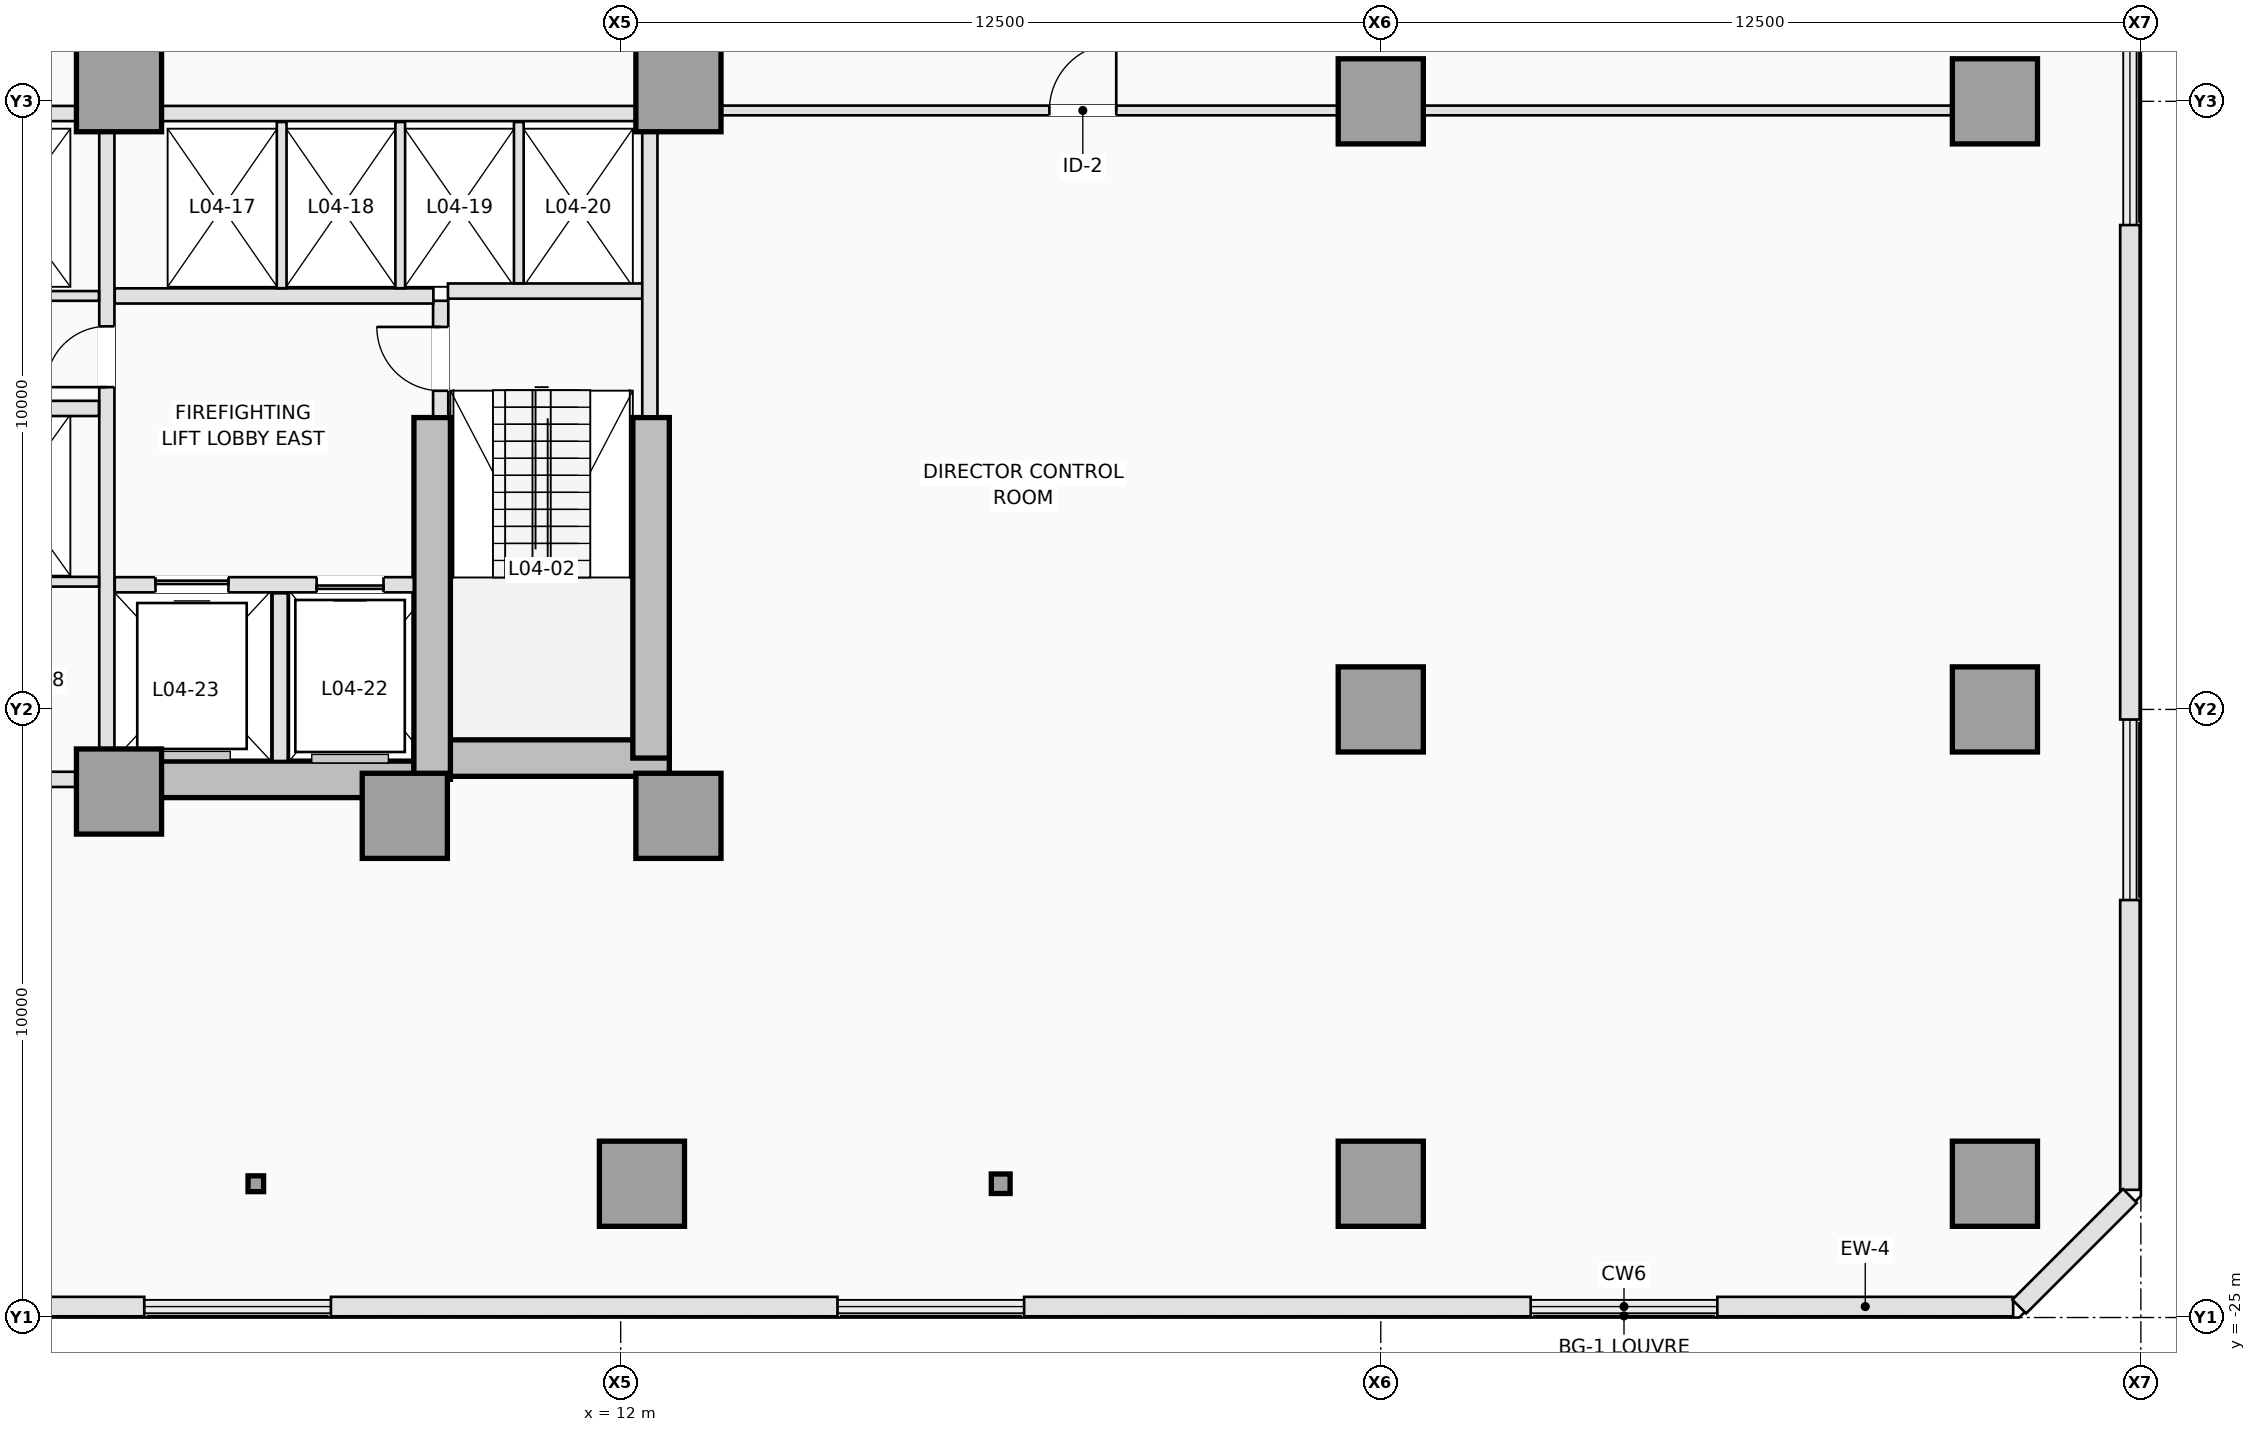
"""IFC4 building model, lengths in metres.
Left out: names, types, materials, properties, quantities, classifications, styles, units other than length and angle.
Written with IfcOpenShell. Run it as: python <this file> out.ifc"""

import sys

from ifc_helpers import new_model, si_unit, direction, frame, frame_2d, origin, origin_2d, place, context, subcontext, project, spatial, rectangle, i_section, extrude, element, fill, save


model = new_model("IFC4")
c1 = context("Model", 3, precision=1e-05, world=origin(), true_north=direction((0.0, 1.0)))
c2 = subcontext(c1, "Body", "Model", "MODEL_VIEW")
j1 = project(units=[si_unit("LENGTHUNIT", "METRE"), si_unit("PLANEANGLEUNIT", "RADIAN")], contexts=[c1])
p1 = place(None, origin())
s1 = spatial("IfcSite", under=j1, at=p1, CompositionType="ELEMENT")
p2 = place(p1, origin())
s2 = spatial("IfcBuilding", under=s1, at=p2, CompositionType="ELEMENT")
p3 = place(p2, frame((0.0, 0.0, 18.5)))
s3 = spatial("IfcBuildingStorey", under=s2, at=p3, CompositionType="ELEMENT", Elevation=18.5)
p4 = place(p3, frame((3.75, -16.15, 0.0), z_axis=(0.0, 0.0, 1.0), x_axis=(1.0, 0.0, 0.0)))
e1 = element("IfcWall", 1, at=p4, inside=s3, PredefinedType="SHEAR", context=c2, shape_type="SweptSolid", body=[
    extrude(rectangle(XDim=5.15, YDim=0.6, at=frame_2d((2.575, 0.0))), origin(), (0.0, 0.0, 1.0), 4.5),
])
p5 = place(p3, frame((8.6, -15.8, 0.0), z_axis=(0.0, 0.0, 1.0), x_axis=(1.0, 0.0, 0.0)))
e2 = element("IfcWall", 2, at=p5, inside=s3, PredefinedType="SHEAR", context=c2, shape_type="SweptSolid", body=[
    extrude(rectangle(XDim=4.2, YDim=0.6, at=frame_2d((2.1, 0.0))), origin(), (0.0, 0.0, 1.0), 4.5),
])
p6 = place(p3, frame((12.5, -15.8, 0.0), z_axis=(0.0, 0.0, 1.0), x_axis=(0.0, 1.0, 0.0)))
e3 = element("IfcWall", 3, at=p6, inside=s3, PredefinedType="SHEAR", context=c2, shape_type="SweptSolid", body=[
    extrude(rectangle(XDim=5.6, YDim=0.6, at=frame_2d((2.8, 0.0))), origin(), (0.0, 0.0, 1.0), 4.5),
])
p7 = place(p3, frame((8.9, -16.15, 0.0), z_axis=(0.0, 0.0, 1.0), x_axis=(0.0, 1.0, 0.0)))
e4 = element("IfcWall", 4, at=p7, inside=s3, PredefinedType="SHEAR", context=c2, shape_type="SweptSolid", body=[
    extrude(rectangle(XDim=5.95, YDim=0.6, at=frame_2d((2.975, 0.0))), origin(), (0.0, 0.0, 1.0), 4.5),
])
for number, where, z_axis, x_axis in (
    (5, (3.75, -16.35, 0.0), (0.0, 0.0, 1.0), (1.0, 0.0, 0.0)),
    (6, (8.45, -16.75, 0.0), (0.0, 0.0, 1.0), (1.0, 0.0, 0.0)),
    (7, (12.95, -16.75, 0.0), (0.0, 0.0, 1.0), (1.0, 0.0, 0.0)),
    (8, (3.75, -4.8, 0.0), (0.0, 0.0, 1.0), (1.0, 0.0, 0.0)),
    (9, (12.95, -4.8, 0.0), (0.0, 0.0, 1.0), (1.0, 0.0, 0.0)),
    (10, (12.35, -22.8, 0.0), (0.0, 0.0, 1.0), (1.0, 0.0, 0.0)),
    (11, (24.5, -22.8, 0.0), (0.0, 0.0, 1.0), (1.0, 0.0, 0.0)),
    (12, (34.6, -22.8, 0.0), (0.0, 0.0, 1.0), (1.0, 0.0, 0.0)),
    (13, (24.5, -15.0, 0.0), (0.0, 0.0, 1.0), (1.0, 0.0, 0.0)),
    (14, (34.6, -15.0, 0.0), (0.0, 0.0, 1.0), (1.0, 0.0, 0.0)),
    (15, (24.5, -5.0, 0.0), (0.0, 0.0, 1.0), (1.0, 0.0, 0.0)),
    (16, (34.6, -5.0, 0.0), (0.0, 0.0, 1.0), (1.0, 0.0, 0.0)),
):
    element("IfcColumn", number, at=place(p3, frame(where, z_axis=z_axis, x_axis=x_axis)), inside=s3, PredefinedType="COLUMN", context=c2, shape_type="SweptSolid", body=[
        extrude(rectangle(XDim=1.4, YDim=1.4, at=origin_2d()), origin(), (0.0, 0.0, 1.0), 4.5),
    ])
p8 = place(p3, frame((18.25, -22.8, 0.0), z_axis=(0.0, 0.0, 1.0), x_axis=(1.0, 0.0, 0.0)))
e17 = element("IfcColumn", 17, at=p8, inside=s3, PredefinedType="COLUMN", context=c2, shape_type="SweptSolid", body=[
    extrude(i_section(OverallWidth=0.309, OverallDepth=0.321, WebThickness=0.014, FlangeThickness=0.022, FilletRadius=0.017, at=origin_2d()), origin(), (0.0, 0.0, 1.0), 4.5),
])
p9 = place(p3, frame((6.0, -22.8, 0.0), z_axis=(0.0, 0.0, 1.0), x_axis=(1.0, 0.0, 0.0)))
e18 = element("IfcColumn", 18, at=p9, inside=s3, PredefinedType="COLUMN", context=c2, shape_type="SweptSolid", body=[
    extrude(i_section(OverallWidth=0.256, OverallDepth=0.26, WebThickness=0.01, FlangeThickness=0.017, FilletRadius=0.014, at=origin_2d()), origin(), (0.0, 0.0, 1.0), 4.5),
])
p10 = place(p3, frame((34.9, -24.82, 0.0), z_axis=(0.0, 0.0, 1.0), x_axis=(-1.0, 0.0, 0.0)))
e19 = element("IfcWall", 19, at=p10, inside=s3, PredefinedType="STANDARD", context=c2, shape_type="SweptSolid", body=[
    extrude(rectangle(XDim=4.865, YDim=0.32, at=frame_2d((2.433, 0.0))), origin(), (0.0, 0.0, 1.0), 4.08),
])
p11 = place(p3, frame((26.965, -24.82, 0.0), z_axis=(0.0, 0.0, 1.0), x_axis=(-1.0, 0.0, 0.0)))
e20 = element("IfcWall", 20, at=p11, inside=s3, PredefinedType="STANDARD", context=c2, shape_type="SweptSolid", body=[
    extrude(rectangle(XDim=8.33, YDim=0.32, at=frame_2d((4.165, 0.0))), origin(), (0.0, 0.0, 1.0), 4.08),
])
p12 = place(p3, frame((15.565, -24.82, 0.0), z_axis=(0.0, 0.0, 1.0), x_axis=(-1.0, 0.0, 0.0)))
e21 = element("IfcWall", 21, at=p12, inside=s3, PredefinedType="STANDARD", context=c2, shape_type="SweptSolid", body=[
    extrude(rectangle(XDim=8.33, YDim=0.32, at=frame_2d((4.165, 0.0))), origin(), (0.0, 0.0, 1.0), 4.08),
])
p13 = place(p3, frame((4.165, -24.82, 0.0), z_axis=(0.0, 0.0, 1.0), x_axis=(-1.0, 0.0, 0.0)))
e22 = element("IfcWall", 22, at=p13, inside=s3, PredefinedType="STANDARD", context=c2, shape_type="SweptSolid", body=[
    extrude(rectangle(XDim=8.33, YDim=0.32, at=frame_2d((4.165, 0.0))), origin(), (0.0, 0.0, 1.0), 4.08),
])
p14 = place(p3, frame((36.82, -7.035, 0.0), z_axis=(0.0, 0.0, 1.0), x_axis=(0.0, -1.0, 0.0)))
e23 = element("IfcWall", 23, at=p14, inside=s3, PredefinedType="STANDARD", context=c2, shape_type="SweptSolid", body=[
    extrude(rectangle(XDim=8.131, YDim=0.32, at=frame_2d((4.065, 0.0))), origin(), (0.0, 0.0, 1.0), 4.08),
])
p15 = place(p3, frame((36.82, -18.135, 0.0), z_axis=(0.0, 0.0, 1.0), x_axis=(0.0, -1.0, 0.0)))
e24 = element("IfcWall", 24, at=p15, inside=s3, PredefinedType="STANDARD", context=c2, shape_type="SweptSolid", body=[
    extrude(rectangle(XDim=4.765, YDim=0.32, at=frame_2d((2.383, 0.0))), origin(), (0.0, 0.0, 1.0), 4.08),
])
p16 = place(p3, frame((36.82, -23.0, 0.0), z_axis=(0.0, 0.0, 1.0), x_axis=(-0.707106781187, -0.707106781187, 0.0)))
e25 = element("IfcWall", 25, at=p16, inside=s3, PredefinedType="STANDARD", context=c2, shape_type="SweptSolid", body=[
    extrude(rectangle(XDim=2.574, YDim=0.32, at=frame_2d((1.287, 0.0))), origin(), (0.0, 0.0, 1.0), 4.08),
])
p17 = place(p3, frame((9.04, -10.18, 0.0), z_axis=(0.0, 0.0, 1.0), x_axis=(0.0, 1.0, 0.0)))
e26 = element("IfcWall", 26, at=p17, inside=s3, PredefinedType="PARTITIONING", context=c2, shape_type="SweptSolid", body=[
    extrude(rectangle(XDim=1.9, YDim=0.25, at=frame_2d((0.95, 0.0))), origin(), (0.0, 0.0, 1.0), 4.08),
])
p18 = place(p17, frame((0.42, 0.0, 0.0)))
e27 = element("IfcOpeningElement", 27, at=p18, cuts=e26, PredefinedType="OPENING", context=c2, shape_type="SweptSolid", body=[
    extrude(rectangle(XDim=1.05, YDim=2.15, at=frame_2d((0.525, 1.075))), frame((0.0, 0.135, 0.0), z_axis=(0.0, -1.0, 0.0), x_axis=(1.0, 0.0, 0.0)), (0.0, 0.0, 1.0), 0.27),
])
p19 = place(p3, frame((9.16, -8.12, 0.0), z_axis=(0.0, 0.0, 1.0), x_axis=(1.0, 0.0, 0.0)))
e28 = element("IfcWall", 28, at=p19, inside=s3, PredefinedType="PARTITIONING", context=c2, shape_type="SweptSolid", body=[
    extrude(rectangle(XDim=3.22, YDim=0.25, at=frame_2d((1.61, 0.0))), origin(), (0.0, 0.0, 1.0), 4.08),
])
p20 = place(p3, frame((12.48, -10.18, 0.0), z_axis=(0.0, 0.0, 1.0), x_axis=(0.0, 1.0, 0.0)))
e29 = element("IfcWall", 29, at=p20, inside=s3, PredefinedType="PARTITIONING", context=c2, shape_type="SweptSolid", body=[
    extrude(rectangle(XDim=4.678, YDim=0.25, at=frame_2d((2.339, 0.0))), origin(), (0.0, 0.0, 1.0), 4.08),
])
p21 = place(p3, frame((3.68, -12.95, 0.0), z_axis=(0.0, 0.0, 1.0), x_axis=(1.0, 0.0, 0.0)))
e30 = element("IfcWall", 30, at=p21, inside=s3, PredefinedType="PARTITIONING", context=c2, shape_type="SweptSolid", body=[
    extrude(rectangle(XDim=4.918, YDim=0.25, at=frame_2d((2.459, 0.0))), origin(), (0.0, 0.0, 1.0), 4.08),
])
p22 = place(p21, frame((3.32, 0.0, 0.0)))
e31 = element("IfcOpeningElement", 31, at=p22, cuts=e30, PredefinedType="OPENING", context=c2, shape_type="SweptSolid", body=[
    extrude(rectangle(XDim=1.1, YDim=2.15, at=frame_2d((0.55, 1.075))), frame((0.0, 0.135, 0.0), z_axis=(0.0, -1.0, 0.0), x_axis=(1.0, 0.0, 0.0)), (0.0, 0.0, 1.0), 0.27),
])
p23 = place(p21, frame((0.67, 0.0, 0.0)))
e32 = element("IfcOpeningElement", 32, at=p23, cuts=e30, PredefinedType="OPENING", context=c2, shape_type="SweptSolid", body=[
    extrude(rectangle(XDim=1.2, YDim=2.15, at=frame_2d((0.6, 1.075))), frame((0.0, 0.135, 0.0), z_axis=(0.0, -1.0, 0.0), x_axis=(1.0, 0.0, 0.0)), (0.0, 0.0, 1.0), 0.27),
])
p24 = place(p3, frame((6.4, -15.848, 0.0), z_axis=(0.0, 0.0, 1.0), x_axis=(0.0, 1.0, 0.0)))
e33 = element("IfcWall", 33, at=p24, inside=s3, PredefinedType="PARTITIONING", context=c2, shape_type="SweptSolid", body=[
    extrude(rectangle(XDim=2.758, YDim=0.25, at=frame_2d((1.379, 0.0))), origin(), (0.0, 0.0, 1.0), 4.08),
])
p25 = place(p3, frame((3.68, -8.2, 0.0), z_axis=(0.0, 0.0, 1.0), x_axis=(1.0, 0.0, 0.0)))
e34 = element("IfcWall", 34, at=p25, inside=s3, PredefinedType="PARTITIONING", context=c2, shape_type="SweptSolid", body=[
    extrude(rectangle(XDim=5.24, YDim=0.25, at=frame_2d((2.62, 0.0))), origin(), (0.0, 0.0, 1.0), 4.08),
])
p26 = place(p3, frame((3.55, -15.648, 0.0), z_axis=(0.0, 0.0, 1.0), x_axis=(0.0, 1.0, 0.0)))
e35 = element("IfcWall", 35, at=p26, inside=s3, PredefinedType="PARTITIONING", context=c2, shape_type="SweptSolid", body=[
    extrude(rectangle(XDim=10.146, YDim=0.25, at=frame_2d((5.073, 0.0))), origin(), (0.0, 0.0, 1.0), 4.08),
])
p27 = place(p26, frame((5.948, 0.0, 0.0)))
e36 = element("IfcOpeningElement", 36, at=p27, cuts=e35, PredefinedType="OPENING", context=c2, shape_type="SweptSolid", body=[
    extrude(rectangle(XDim=1.0, YDim=2.15, at=frame_2d((0.5, 1.075))), frame((0.0, 0.135, 0.0), z_axis=(0.0, -1.0, 0.0), x_axis=(1.0, 0.0, 0.0)), (0.0, 0.0, 1.0), 0.27),
])
p28 = place(p3, frame((4.452, -5.2, 0.0), z_axis=(0.0, 0.0, 1.0), x_axis=(1.0, 0.0, 0.0)))
e37 = element("IfcWall", 37, at=p28, inside=s3, PredefinedType="PARTITIONING", context=c2, shape_type="SweptSolid", body=[
    extrude(rectangle(XDim=7.796, YDim=0.25, at=frame_2d((3.898, 0.0))), origin(), (0.0, 0.0, 1.0), 4.08),
])
p29 = place(p3, frame((0.95, -5.2, 0.0), z_axis=(0.0, 0.0, 1.0), x_axis=(1.0, 0.0, 0.0)))
e38 = element("IfcWall", 38, at=p29, inside=s3, PredefinedType="PARTITIONING", context=c2, shape_type="SweptSolid", body=[
    extrude(rectangle(XDim=2.098, YDim=0.25, at=frame_2d((1.049, 0.0))), origin(), (0.0, 0.0, 1.0), 4.08),
])
for number, where, z_axis, x_axis in (
    (39, (6.425, -8.073, 0.0), (0.0, 0.0, 1.0), (0.0, 1.0, 0.0)),
    (40, (8.375, -8.073, 0.0), (0.0, 0.0, 1.0), (0.0, 1.0, 0.0)),
):
    element("IfcWall", number, at=place(p3, frame(where, z_axis=z_axis, x_axis=x_axis)), inside=s3, PredefinedType="PARTITIONING", context=c2, shape_type="SweptSolid", body=[
        extrude(rectangle(XDim=2.733, YDim=0.16, at=frame_2d((1.366, 0.0))), origin(), (0.0, 0.0, 1.0), 4.08),
    ])
p30 = place(p3, frame((10.325, -7.993, 0.0), z_axis=(0.0, 0.0, 1.0), x_axis=(0.0, 1.0, 0.0)))
e41 = element("IfcWall", 41, at=p30, inside=s3, PredefinedType="PARTITIONING", context=c2, shape_type="SweptSolid", body=[
    extrude(rectangle(XDim=2.653, YDim=0.16, at=frame_2d((1.326, 0.0))), origin(), (0.0, 0.0, 1.0), 4.08),
])
p31 = place(p3, frame((-3.048, -16.15, 0.0), z_axis=(0.0, 0.0, 1.0), x_axis=(1.0, 0.0, 0.0)))
e42 = element("IfcWall", 42, at=p31, inside=s3, PredefinedType="PARTITIONING", context=c2, shape_type="SweptSolid", body=[
    extrude(rectangle(XDim=6.096, YDim=0.25, at=frame_2d((3.048, 0.0))), origin(), (0.0, 0.0, 1.0), 3.056),
])
p32 = place(p3, frame((0.95, -8.2, 0.0), z_axis=(0.0, 0.0, 1.0), x_axis=(1.0, 0.0, 0.0)))
e43 = element("IfcWall", 43, at=p32, inside=s3, PredefinedType="PARTITIONING", context=c2, shape_type="SweptSolid", body=[
    extrude(rectangle(XDim=2.47, YDim=0.16, at=frame_2d((1.235, 0.0))), origin(), (0.0, 0.0, 1.0), 4.08),
])
p33 = place(p3, frame((0.95, -10.05, 0.0), z_axis=(0.0, 0.0, 1.0), x_axis=(1.0, 0.0, 0.0)))
e44 = element("IfcWall", 44, at=p33, inside=s3, PredefinedType="PARTITIONING", context=c2, shape_type="SweptSolid", body=[
    extrude(rectangle(XDim=2.47, YDim=0.25, at=frame_2d((1.235, 0.0))), origin(), (0.0, 0.0, 1.0), 4.08),
])
p34 = place(p3, frame((-3.42, -12.9, 0.0), z_axis=(0.0, 0.0, 1.0), x_axis=(1.0, 0.0, 0.0)))
e45 = element("IfcWall", 45, at=p34, inside=s3, PredefinedType="PARTITIONING", context=c2, shape_type="SweptSolid", body=[
    extrude(rectangle(XDim=6.84, YDim=0.16, at=frame_2d((3.42, 0.0))), origin(), (0.0, 0.0, 1.0), 4.08),
])
p35 = place(p34, frame((2.98, 0.0, 0.0)))
e46 = element("IfcOpeningElement", 46, at=p35, cuts=e45, PredefinedType="OPENING", context=c2, shape_type="SweptSolid", body=[
    extrude(rectangle(XDim=0.88, YDim=2.12, at=frame_2d((0.44, 1.06))), frame((0.0, 0.09, 0.0), z_axis=(0.0, -1.0, 0.0), x_axis=(1.0, 0.0, 0.0)), (0.0, 0.0, 1.0), 0.18),
])
p36 = place(p3, frame((13.652, -5.15, 0.0), z_axis=(0.0, 0.0, 1.0), x_axis=(1.0, 0.0, 0.0)))
e47 = element("IfcWall", 47, at=p36, inside=s3, PredefinedType="PARTITIONING", context=c2, shape_type="SweptSolid", body=[
    extrude(rectangle(XDim=10.146, YDim=0.16, at=frame_2d((5.073, 0.0))), origin(), (0.0, 0.0, 1.0), 3.056),
])
p37 = place(p36, frame((5.398, 0.0, 0.0)))
e48 = element("IfcOpeningElement", 48, at=p37, cuts=e47, PredefinedType="OPENING", context=c2, shape_type="SweptSolid", body=[
    extrude(rectangle(XDim=1.1, YDim=2.15, at=frame_2d((0.55, 1.075))), frame((0.0, 0.09, 0.0), z_axis=(0.0, -1.0, 0.0), x_axis=(1.0, 0.0, 0.0)), (0.0, 0.0, 1.0), 0.18),
])
p38 = place(p3, frame((25.202, -5.15, 0.0), z_axis=(0.0, 0.0, 1.0), x_axis=(1.0, 0.0, 0.0)))
e49 = element("IfcWall", 49, at=p38, inside=s3, PredefinedType="PARTITIONING", context=c2, shape_type="SweptSolid", body=[
    extrude(rectangle(XDim=8.696, YDim=0.16, at=frame_2d((4.348, 0.0))), origin(), (0.0, 0.0, 1.0), 3.056),
])
p39 = place(p22, origin())
e50 = element("IfcDoor", 50, at=p39, inside=s3, OperationType="SLIDING_TO_RIGHT", PredefinedType="DOOR", context=c2, shape_type="SweptSolid", body=[
    extrude(rectangle(XDim=1.1, YDim=2.15, at=frame_2d((0.55, 1.075))), frame((0.0, 0.025, 0.0), z_axis=(0.0, -1.0, 0.0), x_axis=(1.0, 0.0, 0.0)), (0.0, 0.0, 1.0), 0.05),
])
fill(e31, e50)
p40 = place(p23, origin())
e51 = element("IfcDoor", 51, at=p40, inside=s3, OperationType="SLIDING_TO_LEFT", PredefinedType="DOOR", context=c2, shape_type="SweptSolid", body=[
    extrude(rectangle(XDim=1.2, YDim=2.15, at=frame_2d((0.6, 1.075))), frame((0.0, 0.025, 0.0), z_axis=(0.0, -1.0, 0.0), x_axis=(1.0, 0.0, 0.0)), (0.0, 0.0, 1.0), 0.05),
])
fill(e32, e51)
p41 = place(p18, origin())
e52 = element("IfcDoor", 52, at=p41, inside=s3, OperationType="SINGLE_SWING_RIGHT", PredefinedType="DOOR", context=c2, shape_type="SweptSolid", body=[
    extrude(rectangle(XDim=1.05, YDim=2.15, at=frame_2d((0.525, 1.075))), frame((0.0, 0.025, 0.0), z_axis=(0.0, -1.0, 0.0), x_axis=(1.0, 0.0, 0.0)), (0.0, 0.0, 1.0), 0.05),
])
fill(e27, e52)
p42 = place(p27, origin())
e53 = element("IfcDoor", 53, at=p42, inside=s3, OperationType="SINGLE_SWING_LEFT", PredefinedType="DOOR", context=c2, shape_type="SweptSolid", body=[
    extrude(rectangle(XDim=1.0, YDim=2.15, at=frame_2d((0.5, 1.075))), frame((0.0, 0.025, 0.0), z_axis=(0.0, -1.0, 0.0), x_axis=(1.0, 0.0, 0.0)), (0.0, 0.0, 1.0), 0.05),
])
fill(e36, e53)
p43 = place(p37, origin())
e54 = element("IfcDoor", 54, at=p43, inside=s3, OperationType="SINGLE_SWING_RIGHT", PredefinedType="DOOR", context=c2, shape_type="SweptSolid", body=[
    extrude(rectangle(XDim=1.1, YDim=2.15, at=frame_2d((0.55, 1.075))), frame((0.0, 0.025, 0.0), z_axis=(0.0, -1.0, 0.0), x_axis=(1.0, 0.0, 0.0)), (0.0, 0.0, 1.0), 0.05),
])
fill(e48, e54)
save(model, sys.argv[1])
